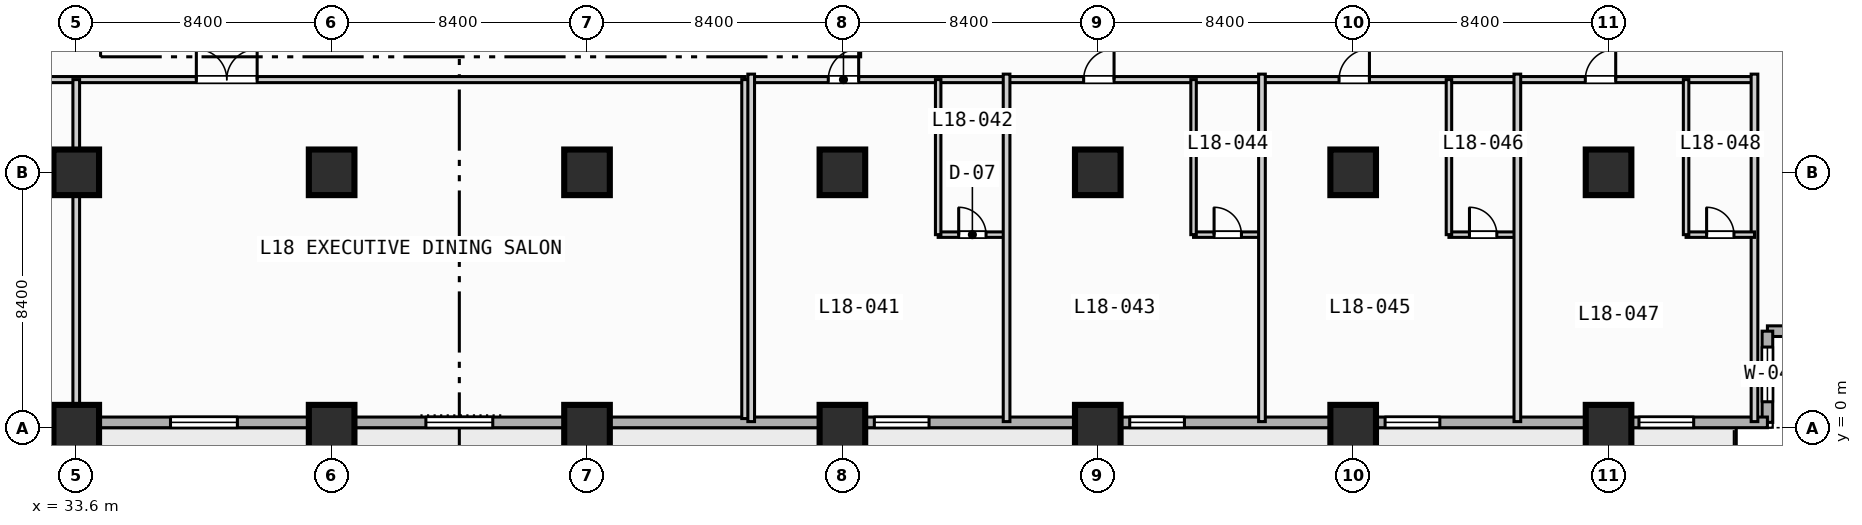
"""IFC4 building model, lengths in metres.
Left out: names, types, materials, properties, quantities, classifications, styles, units other than length and angle.
Written with IfcOpenShell. Run it as: python <this file> out.ifc"""

import sys

from ifc_helpers import new_model, si_unit, direction, frame, frame_2d, origin, origin_2d, place, context, subcontext, project, spatial, rectangle, extrude, element, fill, save


model = new_model("IFC4")
c1 = context("Model", 3, precision=1e-05, world=origin(), true_north=direction((0.0, 1.0)))
c2 = subcontext(c1, "Body", "Model", "MODEL_VIEW")
j1 = project(units=[si_unit("LENGTHUNIT", "METRE"), si_unit("PLANEANGLEUNIT", "RADIAN")], contexts=[c1])
p1 = place(None, origin())
s1 = spatial("IfcSite", under=j1, at=p1, CompositionType="ELEMENT")
p2 = place(p1, origin())
s2 = spatial("IfcBuilding", under=s1, at=p2, CompositionType="ELEMENT")
p3 = place(p2, frame((0.0, 0.0, 77.6)))
s3 = spatial("IfcBuildingStorey", under=s2, at=p3, CompositionType="ELEMENT", Elevation=77.6)
for number, where, z_axis, x_axis in (
    (1, (33.6, 0.0, 0.0), (0.0, 0.0, 1.0), (1.0, 0.0, 0.0)),
    (2, (33.6, 8.4, 0.0), (0.0, 0.0, 1.0), (1.0, 0.0, 0.0)),
    (3, (42.0, 0.0, 0.0), (0.0, 0.0, 1.0), (1.0, 0.0, 0.0)),
    (4, (42.0, 8.4, 0.0), (0.0, 0.0, 1.0), (1.0, 0.0, 0.0)),
    (5, (50.4, 0.0, 0.0), (0.0, 0.0, 1.0), (1.0, 0.0, 0.0)),
    (6, (50.4, 8.4, 0.0), (0.0, 0.0, 1.0), (1.0, 0.0, 0.0)),
    (7, (58.8, 0.0, 0.0), (0.0, 0.0, 1.0), (1.0, 0.0, 0.0)),
    (8, (58.8, 8.4, 0.0), (0.0, 0.0, 1.0), (1.0, 0.0, 0.0)),
    (9, (67.2, 0.0, 0.0), (0.0, 0.0, 1.0), (1.0, 0.0, 0.0)),
    (10, (67.2, 8.4, 0.0), (0.0, 0.0, 1.0), (1.0, 0.0, 0.0)),
    (11, (75.6, 0.0, 0.0), (0.0, 0.0, 1.0), (1.0, 0.0, 0.0)),
    (12, (75.6, 8.4, 0.0), (0.0, 0.0, 1.0), (1.0, 0.0, 0.0)),
    (13, (84.0, 0.0, 0.0), (0.0, 0.0, 1.0), (1.0, 0.0, 0.0)),
    (14, (84.0, 8.4, 0.0), (0.0, 0.0, 1.0), (1.0, 0.0, 0.0)),
):
    element("IfcColumn", number, at=place(p3, frame(where, z_axis=z_axis, x_axis=x_axis)), inside=s3, PredefinedType="COLUMN", context=c2, shape_type="SweptSolid", body=[
        extrude(rectangle(XDim=1.5, YDim=1.5, at=origin_2d()), origin(), (0.0, 0.0, 1.0), 3.8),
    ])
p4 = place(p3, frame((92.225, 3.175, 0.0), z_axis=(0.0, 0.0, 1.0), x_axis=(-1.0, 0.0, 0.0)))
e15 = element("IfcWall", 15, at=p4, inside=s3, PredefinedType="STANDARD", context=c2, shape_type="SweptSolid", body=[
    extrude(rectangle(XDim=3.0, YDim=0.35, at=frame_2d((1.5, 0.0))), origin(), (0.0, 0.0, 1.0), 3.55),
])
p5 = place(p3, frame((89.225, 3.175, 0.0), z_axis=(0.0, 0.0, 1.0), x_axis=(0.0, -1.0, 0.0)))
e16 = element("IfcWall", 16, at=p5, inside=s3, PredefinedType="STANDARD", context=c2, shape_type="SweptSolid", body=[
    extrude(rectangle(XDim=3.0, YDim=0.35, at=frame_2d((1.5, 0.0))), origin(), (0.0, 0.0, 1.0), 3.55),
])
p6 = place(p5, frame((0.522, 0.0, 0.85)))
e17 = element("IfcOpeningElement", 17, at=p6, cuts=e16, PredefinedType="OPENING", context=c2, shape_type="SweptSolid", body=[
    extrude(rectangle(XDim=1.8, YDim=1.8, at=frame_2d((0.9, 0.9))), frame((0.0, 0.185, 0.0), z_axis=(0.0, -1.0, 0.0), x_axis=(1.0, 0.0, 0.0)), (0.0, 0.0, 1.0), 0.37),
])
p7 = place(p3, frame((89.225, 0.175, 0.0), z_axis=(0.0, 0.0, 1.0), x_axis=(-1.0, 0.0, 0.0)))
e18 = element("IfcWall", 18, at=p7, inside=s3, PredefinedType="STANDARD", context=c2, shape_type="SweptSolid", body=[
    extrude(rectangle(XDim=86.05, YDim=0.35, at=frame_2d((43.025, 0.0))), origin(), (0.0, 0.0, 1.0), 3.55),
])
p8 = place(p7, frame((67.525, 0.0, 0.0)))
e19 = element("IfcOpeningElement", 19, at=p8, cuts=e18, PredefinedType="OPENING", context=c2, shape_type="SweptSolid", body=[
    extrude(rectangle(XDim=1.4, YDim=2.2, at=frame_2d((0.7, 1.1))), frame((0.0, 0.185, 0.0), z_axis=(0.0, -1.0, 0.0), x_axis=(1.0, 0.0, 0.0)), (0.0, 0.0, 1.0), 0.37),
])
p9 = place(p7, frame((58.725, 0.0, 0.85)))
e20 = element("IfcOpeningElement", 20, at=p9, cuts=e18, PredefinedType="OPENING", context=c2, shape_type="SweptSolid", body=[
    extrude(rectangle(XDim=2.2, YDim=1.8, at=frame_2d((1.1, 0.9))), frame((0.0, 0.185, 0.0), z_axis=(0.0, -1.0, 0.0), x_axis=(1.0, 0.0, 0.0)), (0.0, 0.0, 1.0), 0.37),
])
p10 = place(p7, frame((50.325, 0.0, 0.85)))
e21 = element("IfcOpeningElement", 21, at=p10, cuts=e18, PredefinedType="OPENING", context=c2, shape_type="SweptSolid", body=[
    extrude(rectangle(XDim=2.2, YDim=1.8, at=frame_2d((1.1, 0.9))), frame((0.0, 0.185, 0.0), z_axis=(0.0, -1.0, 0.0), x_axis=(1.0, 0.0, 0.0)), (0.0, 0.0, 1.0), 0.37),
])
p11 = place(p7, frame((41.925, 0.0, 0.85)))
e22 = element("IfcOpeningElement", 22, at=p11, cuts=e18, PredefinedType="OPENING", context=c2, shape_type="SweptSolid", body=[
    extrude(rectangle(XDim=2.2, YDim=1.8, at=frame_2d((1.1, 0.9))), frame((0.0, 0.185, 0.0), z_axis=(0.0, -1.0, 0.0), x_axis=(1.0, 0.0, 0.0)), (0.0, 0.0, 1.0), 0.37),
])
p12 = place(p7, frame((27.575, 0.0, 0.85)))
e23 = element("IfcOpeningElement", 23, at=p12, cuts=e18, PredefinedType="OPENING", context=c2, shape_type="SweptSolid", body=[
    extrude(rectangle(XDim=1.8, YDim=1.8, at=frame_2d((0.9, 0.9))), frame((0.0, 0.185, 0.0), z_axis=(0.0, -1.0, 0.0), x_axis=(1.0, 0.0, 0.0)), (0.0, 0.0, 1.0), 0.37),
])
p13 = place(p7, frame((19.175, 0.0, 0.85)))
e24 = element("IfcOpeningElement", 24, at=p13, cuts=e18, PredefinedType="OPENING", context=c2, shape_type="SweptSolid", body=[
    extrude(rectangle(XDim=1.8, YDim=1.8, at=frame_2d((0.9, 0.9))), frame((0.0, 0.185, 0.0), z_axis=(0.0, -1.0, 0.0), x_axis=(1.0, 0.0, 0.0)), (0.0, 0.0, 1.0), 0.37),
])
p14 = place(p7, frame((10.775, 0.0, 0.85)))
e25 = element("IfcOpeningElement", 25, at=p14, cuts=e18, PredefinedType="OPENING", context=c2, shape_type="SweptSolid", body=[
    extrude(rectangle(XDim=1.8, YDim=1.8, at=frame_2d((0.9, 0.9))), frame((0.0, 0.185, 0.0), z_axis=(0.0, -1.0, 0.0), x_axis=(1.0, 0.0, 0.0)), (0.0, 0.0, 1.0), 0.37),
])
p15 = place(p7, frame((2.425, 0.0, 0.85)))
e26 = element("IfcOpeningElement", 26, at=p15, cuts=e18, PredefinedType="OPENING", context=c2, shape_type="SweptSolid", body=[
    extrude(rectangle(XDim=1.8, YDim=1.8, at=frame_2d((0.9, 0.9))), frame((0.0, 0.185, 0.0), z_axis=(0.0, -1.0, 0.0), x_axis=(1.0, 0.0, 0.0)), (0.0, 0.0, 1.0), 0.37),
])
p16 = place(p3, frame((13.55, 11.45, 0.0), z_axis=(0.0, 0.0, 1.0), x_axis=(1.0, 0.0, 0.0)))
e27 = element("IfcWall", 27, at=p16, inside=s3, PredefinedType="PARTITIONING", context=c2, shape_type="SweptSolid", body=[
    extrude(rectangle(XDim=42.05, YDim=0.2, at=frame_2d((21.025, 0.0))), origin(), (0.0, 0.0, 1.0), 3.55),
])
p17 = place(p16, frame((5.0, 0.0, 0.0)))
e28 = element("IfcOpeningElement", 28, at=p17, cuts=e27, PredefinedType="OPENING", context=c2, shape_type="SweptSolid", body=[
    extrude(rectangle(XDim=2.0, YDim=2.15, at=frame_2d((1.0, 1.075))), frame((0.0, 0.11, 0.0), z_axis=(0.0, -1.0, 0.0), x_axis=(1.0, 0.0, 0.0)), (0.0, 0.0, 1.0), 0.22),
])
p18 = place(p16, frame((24.0, 0.0, 0.0)))
e29 = element("IfcOpeningElement", 29, at=p18, cuts=e27, PredefinedType="OPENING", context=c2, shape_type="SweptSolid", body=[
    extrude(rectangle(XDim=2.0, YDim=2.15, at=frame_2d((1.0, 1.075))), frame((0.0, 0.11, 0.0), z_axis=(0.0, -1.0, 0.0), x_axis=(1.0, 0.0, 0.0)), (0.0, 0.0, 1.0), 0.22),
])
p19 = place(p3, frame((33.6, 0.3, 0.0), z_axis=(0.0, 0.0, 1.0), x_axis=(0.0, 1.0, 0.0)))
e30 = element("IfcWall", 30, at=p19, inside=s3, PredefinedType="PARTITIONING", context=c2, shape_type="SweptSolid", body=[
    extrude(rectangle(XDim=11.15, YDim=0.22, at=frame_2d((5.575, 0.0))), origin(), (0.0, 0.0, 1.0), 2.8),
])
p20 = place(p3, frame((55.6, 0.3, 0.0), z_axis=(0.0, 0.0, 1.0), x_axis=(0.0, 1.0, 0.0)))
e31 = element("IfcWall", 31, at=p20, inside=s3, PredefinedType="PARTITIONING", context=c2, shape_type="SweptSolid", body=[
    extrude(rectangle(XDim=11.15, YDim=0.22, at=frame_2d((5.575, 0.0))), origin(), (0.0, 0.0, 1.0), 3.55),
])
p21 = place(p3, frame((55.8, 11.45, 0.0), z_axis=(0.0, 0.0, 1.0), x_axis=(1.0, 0.0, 0.0)))
e32 = element("IfcWall", 32, at=p21, inside=s3, PredefinedType="PARTITIONING", context=c2, shape_type="SweptSolid", body=[
    extrude(rectangle(XDim=33.0, YDim=0.2, at=frame_2d((16.5, 0.0))), origin(), (0.0, 0.0, 1.0), 3.55),
])
p22 = place(p21, frame((2.535, 0.0, 0.0)))
e33 = element("IfcOpeningElement", 33, at=p22, cuts=e32, PredefinedType="OPENING", context=c2, shape_type="SweptSolid", body=[
    extrude(rectangle(XDim=1.0, YDim=2.15, at=frame_2d((0.5, 1.075))), frame((0.0, 0.11, 0.0), z_axis=(0.0, -1.0, 0.0), x_axis=(1.0, 0.0, 0.0)), (0.0, 0.0, 1.0), 0.22),
])
p23 = place(p21, frame((10.935, 0.0, 0.0)))
e34 = element("IfcOpeningElement", 34, at=p23, cuts=e32, PredefinedType="OPENING", context=c2, shape_type="SweptSolid", body=[
    extrude(rectangle(XDim=1.0, YDim=2.15, at=frame_2d((0.5, 1.075))), frame((0.0, 0.11, 0.0), z_axis=(0.0, -1.0, 0.0), x_axis=(1.0, 0.0, 0.0)), (0.0, 0.0, 1.0), 0.22),
])
p24 = place(p21, frame((19.335, 0.0, 0.0)))
e35 = element("IfcOpeningElement", 35, at=p24, cuts=e32, PredefinedType="OPENING", context=c2, shape_type="SweptSolid", body=[
    extrude(rectangle(XDim=1.0, YDim=2.15, at=frame_2d((0.5, 1.075))), frame((0.0, 0.11, 0.0), z_axis=(0.0, -1.0, 0.0), x_axis=(1.0, 0.0, 0.0)), (0.0, 0.0, 1.0), 0.22),
])
p25 = place(p21, frame((27.435, 0.0, 0.0)))
e36 = element("IfcOpeningElement", 36, at=p25, cuts=e32, PredefinedType="OPENING", context=c2, shape_type="SweptSolid", body=[
    extrude(rectangle(XDim=1.0, YDim=2.15, at=frame_2d((0.5, 1.075))), frame((0.0, 0.11, 0.0), z_axis=(0.0, -1.0, 0.0), x_axis=(1.0, 0.0, 0.0)), (0.0, 0.0, 1.0), 0.22),
])
p26 = place(p3, frame((55.8, 0.2, 0.0), z_axis=(0.0, 0.0, 1.0), x_axis=(0.0, 1.0, 0.0)))
e37 = element("IfcWall", 37, at=p26, inside=s3, PredefinedType="PARTITIONING", context=c2, shape_type="SweptSolid", body=[
    extrude(rectangle(XDim=11.43, YDim=0.22, at=frame_2d((5.715, 0.0))), origin(), (0.0, 0.0, 1.0), 3.55),
])
p27 = place(p3, frame((61.95, 6.35, 0.0), z_axis=(0.0, 0.0, 1.0), x_axis=(1.0, 0.0, 0.0)))
e38 = element("IfcWall", 38, at=p27, inside=s3, PredefinedType="PLUMBINGWALL", context=c2, shape_type="SweptSolid", body=[
    extrude(rectangle(XDim=2.25, YDim=0.18, at=frame_2d((1.125, 0.0))), origin(), (0.0, 0.0, 1.0), 3.55),
])
p28 = place(p27, frame((0.675, 0.0, 0.0)))
e39 = element("IfcOpeningElement", 39, at=p28, cuts=e38, PredefinedType="OPENING", context=c2, shape_type="SweptSolid", body=[
    extrude(rectangle(XDim=0.9, YDim=2.1, at=frame_2d((0.45, 1.05))), frame((0.0, 0.1, 0.0), z_axis=(0.0, -1.0, 0.0), x_axis=(1.0, 0.0, 0.0)), (0.0, 0.0, 1.0), 0.2),
])
p29 = place(p3, frame((61.95, 6.35, 0.0), z_axis=(0.0, 0.0, 1.0), x_axis=(0.0, 1.0, 0.0)))
e40 = element("IfcWall", 40, at=p29, inside=s3, PredefinedType="PLUMBINGWALL", context=c2, shape_type="SweptSolid", body=[
    extrude(rectangle(XDim=5.1, YDim=0.18, at=frame_2d((2.55, 0.0))), origin(), (0.0, 0.0, 1.0), 3.55),
])
p30 = place(p3, frame((64.2, 0.2, 0.0), z_axis=(0.0, 0.0, 1.0), x_axis=(0.0, 1.0, 0.0)))
e41 = element("IfcWall", 41, at=p30, inside=s3, PredefinedType="PARTITIONING", context=c2, shape_type="SweptSolid", body=[
    extrude(rectangle(XDim=11.43, YDim=0.22, at=frame_2d((5.715, 0.0))), origin(), (0.0, 0.0, 1.0), 3.55),
])
p31 = place(p3, frame((70.35, 6.35, 0.0), z_axis=(0.0, 0.0, 1.0), x_axis=(1.0, 0.0, 0.0)))
e42 = element("IfcWall", 42, at=p31, inside=s3, PredefinedType="PLUMBINGWALL", context=c2, shape_type="SweptSolid", body=[
    extrude(rectangle(XDim=2.25, YDim=0.18, at=frame_2d((1.125, 0.0))), origin(), (0.0, 0.0, 1.0), 3.55),
])
p32 = place(p31, frame((0.675, 0.0, 0.0)))
e43 = element("IfcOpeningElement", 43, at=p32, cuts=e42, PredefinedType="OPENING", context=c2, shape_type="SweptSolid", body=[
    extrude(rectangle(XDim=0.9, YDim=2.1, at=frame_2d((0.45, 1.05))), frame((0.0, 0.1, 0.0), z_axis=(0.0, -1.0, 0.0), x_axis=(1.0, 0.0, 0.0)), (0.0, 0.0, 1.0), 0.2),
])
p33 = place(p3, frame((70.35, 6.35, 0.0), z_axis=(0.0, 0.0, 1.0), x_axis=(0.0, 1.0, 0.0)))
e44 = element("IfcWall", 44, at=p33, inside=s3, PredefinedType="PLUMBINGWALL", context=c2, shape_type="SweptSolid", body=[
    extrude(rectangle(XDim=5.1, YDim=0.18, at=frame_2d((2.55, 0.0))), origin(), (0.0, 0.0, 1.0), 3.55),
])
p34 = place(p3, frame((72.6, 0.2, 0.0), z_axis=(0.0, 0.0, 1.0), x_axis=(0.0, 1.0, 0.0)))
e45 = element("IfcWall", 45, at=p34, inside=s3, PredefinedType="PARTITIONING", context=c2, shape_type="SweptSolid", body=[
    extrude(rectangle(XDim=11.43, YDim=0.22, at=frame_2d((5.715, 0.0))), origin(), (0.0, 0.0, 1.0), 3.55),
])
p35 = place(p3, frame((78.75, 6.35, 0.0), z_axis=(0.0, 0.0, 1.0), x_axis=(1.0, 0.0, 0.0)))
e46 = element("IfcWall", 46, at=p35, inside=s3, PredefinedType="PLUMBINGWALL", context=c2, shape_type="SweptSolid", body=[
    extrude(rectangle(XDim=2.25, YDim=0.18, at=frame_2d((1.125, 0.0))), origin(), (0.0, 0.0, 1.0), 3.55),
])
p36 = place(p35, frame((0.675, 0.0, 0.0)))
e47 = element("IfcOpeningElement", 47, at=p36, cuts=e46, PredefinedType="OPENING", context=c2, shape_type="SweptSolid", body=[
    extrude(rectangle(XDim=0.9, YDim=2.1, at=frame_2d((0.45, 1.05))), frame((0.0, 0.1, 0.0), z_axis=(0.0, -1.0, 0.0), x_axis=(1.0, 0.0, 0.0)), (0.0, 0.0, 1.0), 0.2),
])
p37 = place(p3, frame((78.75, 6.35, 0.0), z_axis=(0.0, 0.0, 1.0), x_axis=(0.0, 1.0, 0.0)))
e48 = element("IfcWall", 48, at=p37, inside=s3, PredefinedType="PLUMBINGWALL", context=c2, shape_type="SweptSolid", body=[
    extrude(rectangle(XDim=5.1, YDim=0.18, at=frame_2d((2.55, 0.0))), origin(), (0.0, 0.0, 1.0), 3.55),
])
for number, where, z_axis, x_axis in (
    (49, (81.0, 0.2, 0.0), (0.0, 0.0, 1.0), (0.0, 1.0, 0.0)),
    (50, (88.8, 0.2, 0.0), (0.0, 0.0, 1.0), (0.0, 1.0, 0.0)),
):
    element("IfcWall", number, at=place(p3, frame(where, z_axis=z_axis, x_axis=x_axis)), inside=s3, PredefinedType="PARTITIONING", context=c2, shape_type="SweptSolid", body=[
        extrude(rectangle(XDim=11.43, YDim=0.22, at=frame_2d((5.715, 0.0))), origin(), (0.0, 0.0, 1.0), 3.55),
    ])
p38 = place(p3, frame((86.55, 6.35, 0.0), z_axis=(0.0, 0.0, 1.0), x_axis=(1.0, 0.0, 0.0)))
e51 = element("IfcWall", 51, at=p38, inside=s3, PredefinedType="PLUMBINGWALL", context=c2, shape_type="SweptSolid", body=[
    extrude(rectangle(XDim=2.25, YDim=0.18, at=frame_2d((1.125, 0.0))), origin(), (0.0, 0.0, 1.0), 3.55),
])
p39 = place(p38, frame((0.675, 0.0, 0.0)))
e52 = element("IfcOpeningElement", 52, at=p39, cuts=e51, PredefinedType="OPENING", context=c2, shape_type="SweptSolid", body=[
    extrude(rectangle(XDim=0.9, YDim=2.1, at=frame_2d((0.45, 1.05))), frame((0.0, 0.1, 0.0), z_axis=(0.0, -1.0, 0.0), x_axis=(1.0, 0.0, 0.0)), (0.0, 0.0, 1.0), 0.2),
])
p40 = place(p3, frame((86.55, 6.35, 0.0), z_axis=(0.0, 0.0, 1.0), x_axis=(0.0, 1.0, 0.0)))
e53 = element("IfcWall", 53, at=p40, inside=s3, PredefinedType="PLUMBINGWALL", context=c2, shape_type="SweptSolid", body=[
    extrude(rectangle(XDim=5.1, YDim=0.18, at=frame_2d((2.55, 0.0))), origin(), (0.0, 0.0, 1.0), 3.55),
])
p41 = place(p6, origin())
e54 = element("IfcWindow", 54, at=p41, inside=s3, PartitioningType="SINGLE_PANEL", PredefinedType="WINDOW", context=c2, shape_type="SweptSolid", body=[
    extrude(rectangle(XDim=1.8, YDim=1.8, at=frame_2d((0.9, 0.9))), frame((0.0, 0.03, 0.0), z_axis=(0.0, -1.0, 0.0), x_axis=(1.0, 0.0, 0.0)), (0.0, 0.0, 1.0), 0.06),
])
fill(e17, e54)
p42 = place(p10, origin())
e55 = element("IfcWindow", 55, at=p42, inside=s3, PartitioningType="SINGLE_PANEL", PredefinedType="WINDOW", context=c2, shape_type="SweptSolid", body=[
    extrude(rectangle(XDim=2.2, YDim=1.8, at=frame_2d((1.1, 0.9))), frame((0.0, 0.03, 0.0), z_axis=(0.0, -1.0, 0.0), x_axis=(1.0, 0.0, 0.0)), (0.0, 0.0, 1.0), 0.06),
])
fill(e21, e55)
p43 = place(p11, origin())
e56 = element("IfcWindow", 56, at=p43, inside=s3, PartitioningType="SINGLE_PANEL", PredefinedType="WINDOW", context=c2, shape_type="SweptSolid", body=[
    extrude(rectangle(XDim=2.2, YDim=1.8, at=frame_2d((1.1, 0.9))), frame((0.0, 0.03, 0.0), z_axis=(0.0, -1.0, 0.0), x_axis=(1.0, 0.0, 0.0)), (0.0, 0.0, 1.0), 0.06),
])
fill(e22, e56)
p44 = place(p12, origin())
e57 = element("IfcWindow", 57, at=p44, inside=s3, PartitioningType="SINGLE_PANEL", PredefinedType="WINDOW", context=c2, shape_type="SweptSolid", body=[
    extrude(rectangle(XDim=1.8, YDim=1.8, at=frame_2d((0.9, 0.9))), frame((0.0, 0.03, 0.0), z_axis=(0.0, -1.0, 0.0), x_axis=(1.0, 0.0, 0.0)), (0.0, 0.0, 1.0), 0.06),
])
fill(e23, e57)
p45 = place(p13, origin())
e58 = element("IfcWindow", 58, at=p45, inside=s3, PartitioningType="SINGLE_PANEL", PredefinedType="WINDOW", context=c2, shape_type="SweptSolid", body=[
    extrude(rectangle(XDim=1.8, YDim=1.8, at=frame_2d((0.9, 0.9))), frame((0.0, 0.03, 0.0), z_axis=(0.0, -1.0, 0.0), x_axis=(1.0, 0.0, 0.0)), (0.0, 0.0, 1.0), 0.06),
])
fill(e24, e58)
p46 = place(p14, origin())
e59 = element("IfcWindow", 59, at=p46, inside=s3, PartitioningType="SINGLE_PANEL", PredefinedType="WINDOW", context=c2, shape_type="SweptSolid", body=[
    extrude(rectangle(XDim=1.8, YDim=1.8, at=frame_2d((0.9, 0.9))), frame((0.0, 0.03, 0.0), z_axis=(0.0, -1.0, 0.0), x_axis=(1.0, 0.0, 0.0)), (0.0, 0.0, 1.0), 0.06),
])
fill(e25, e59)
p47 = place(p15, origin())
e60 = element("IfcWindow", 60, at=p47, inside=s3, PartitioningType="SINGLE_PANEL", PredefinedType="WINDOW", context=c2, shape_type="SweptSolid", body=[
    extrude(rectangle(XDim=1.8, YDim=1.8, at=frame_2d((0.9, 0.9))), frame((0.0, 0.03, 0.0), z_axis=(0.0, -1.0, 0.0), x_axis=(1.0, 0.0, 0.0)), (0.0, 0.0, 1.0), 0.06),
])
fill(e26, e60)
p48 = place(p18, origin())
e61 = element("IfcDoor", 61, at=p48, inside=s3, OperationType="SINGLE_SWING_LEFT", PredefinedType="DOOR", context=c2, shape_type="SweptSolid", body=[
    extrude(rectangle(XDim=2.0, YDim=2.15, at=frame_2d((1.0, 1.075))), frame((0.0, 0.025, 0.0), z_axis=(0.0, -1.0, 0.0), x_axis=(1.0, 0.0, 0.0)), (0.0, 0.0, 1.0), 0.05),
])
fill(e29, e61)
p49 = place(p22, origin())
e62 = element("IfcDoor", 62, at=p49, inside=s3, OperationType="SINGLE_SWING_RIGHT", PredefinedType="DOOR", context=c2, shape_type="SweptSolid", body=[
    extrude(rectangle(XDim=1.0, YDim=2.15, at=frame_2d((0.5, 1.075))), frame((0.0, 0.025, 0.0), z_axis=(0.0, -1.0, 0.0), x_axis=(1.0, 0.0, 0.0)), (0.0, 0.0, 1.0), 0.05),
])
fill(e33, e62)
p50 = place(p23, origin())
e63 = element("IfcDoor", 63, at=p50, inside=s3, OperationType="SINGLE_SWING_RIGHT", PredefinedType="DOOR", context=c2, shape_type="SweptSolid", body=[
    extrude(rectangle(XDim=1.0, YDim=2.15, at=frame_2d((0.5, 1.075))), frame((0.0, 0.025, 0.0), z_axis=(0.0, -1.0, 0.0), x_axis=(1.0, 0.0, 0.0)), (0.0, 0.0, 1.0), 0.05),
])
fill(e34, e63)
p51 = place(p24, origin())
e64 = element("IfcDoor", 64, at=p51, inside=s3, OperationType="SINGLE_SWING_RIGHT", PredefinedType="DOOR", context=c2, shape_type="SweptSolid", body=[
    extrude(rectangle(XDim=1.0, YDim=2.15, at=frame_2d((0.5, 1.075))), frame((0.0, 0.025, 0.0), z_axis=(0.0, -1.0, 0.0), x_axis=(1.0, 0.0, 0.0)), (0.0, 0.0, 1.0), 0.05),
])
fill(e35, e64)
p52 = place(p25, origin())
e65 = element("IfcDoor", 65, at=p52, inside=s3, OperationType="SINGLE_SWING_RIGHT", PredefinedType="DOOR", context=c2, shape_type="SweptSolid", body=[
    extrude(rectangle(XDim=1.0, YDim=2.15, at=frame_2d((0.5, 1.075))), frame((0.0, 0.025, 0.0), z_axis=(0.0, -1.0, 0.0), x_axis=(1.0, 0.0, 0.0)), (0.0, 0.0, 1.0), 0.05),
])
fill(e36, e65)
p53 = place(p28, origin())
e66 = element("IfcDoor", 66, at=p53, inside=s3, OperationType="SINGLE_SWING_LEFT", PredefinedType="DOOR", context=c2, shape_type="SweptSolid", body=[
    extrude(rectangle(XDim=0.9, YDim=2.1, at=frame_2d((0.45, 1.05))), frame((0.0, 0.025, 0.0), z_axis=(0.0, -1.0, 0.0), x_axis=(1.0, 0.0, 0.0)), (0.0, 0.0, 1.0), 0.05),
])
fill(e39, e66)
p54 = place(p32, origin())
e67 = element("IfcDoor", 67, at=p54, inside=s3, OperationType="SINGLE_SWING_LEFT", PredefinedType="DOOR", context=c2, shape_type="SweptSolid", body=[
    extrude(rectangle(XDim=0.9, YDim=2.1, at=frame_2d((0.45, 1.05))), frame((0.0, 0.025, 0.0), z_axis=(0.0, -1.0, 0.0), x_axis=(1.0, 0.0, 0.0)), (0.0, 0.0, 1.0), 0.05),
])
fill(e43, e67)
p55 = place(p36, origin())
e68 = element("IfcDoor", 68, at=p55, inside=s3, OperationType="SINGLE_SWING_LEFT", PredefinedType="DOOR", context=c2, shape_type="SweptSolid", body=[
    extrude(rectangle(XDim=0.9, YDim=2.1, at=frame_2d((0.45, 1.05))), frame((0.0, 0.025, 0.0), z_axis=(0.0, -1.0, 0.0), x_axis=(1.0, 0.0, 0.0)), (0.0, 0.0, 1.0), 0.05),
])
fill(e47, e68)
p56 = place(p39, origin())
e69 = element("IfcDoor", 69, at=p56, inside=s3, OperationType="SINGLE_SWING_LEFT", PredefinedType="DOOR", context=c2, shape_type="SweptSolid", body=[
    extrude(rectangle(XDim=0.9, YDim=2.1, at=frame_2d((0.45, 1.05))), frame((0.0, 0.025, 0.0), z_axis=(0.0, -1.0, 0.0), x_axis=(1.0, 0.0, 0.0)), (0.0, 0.0, 1.0), 0.05),
])
fill(e52, e69)
save(model, sys.argv[1])
